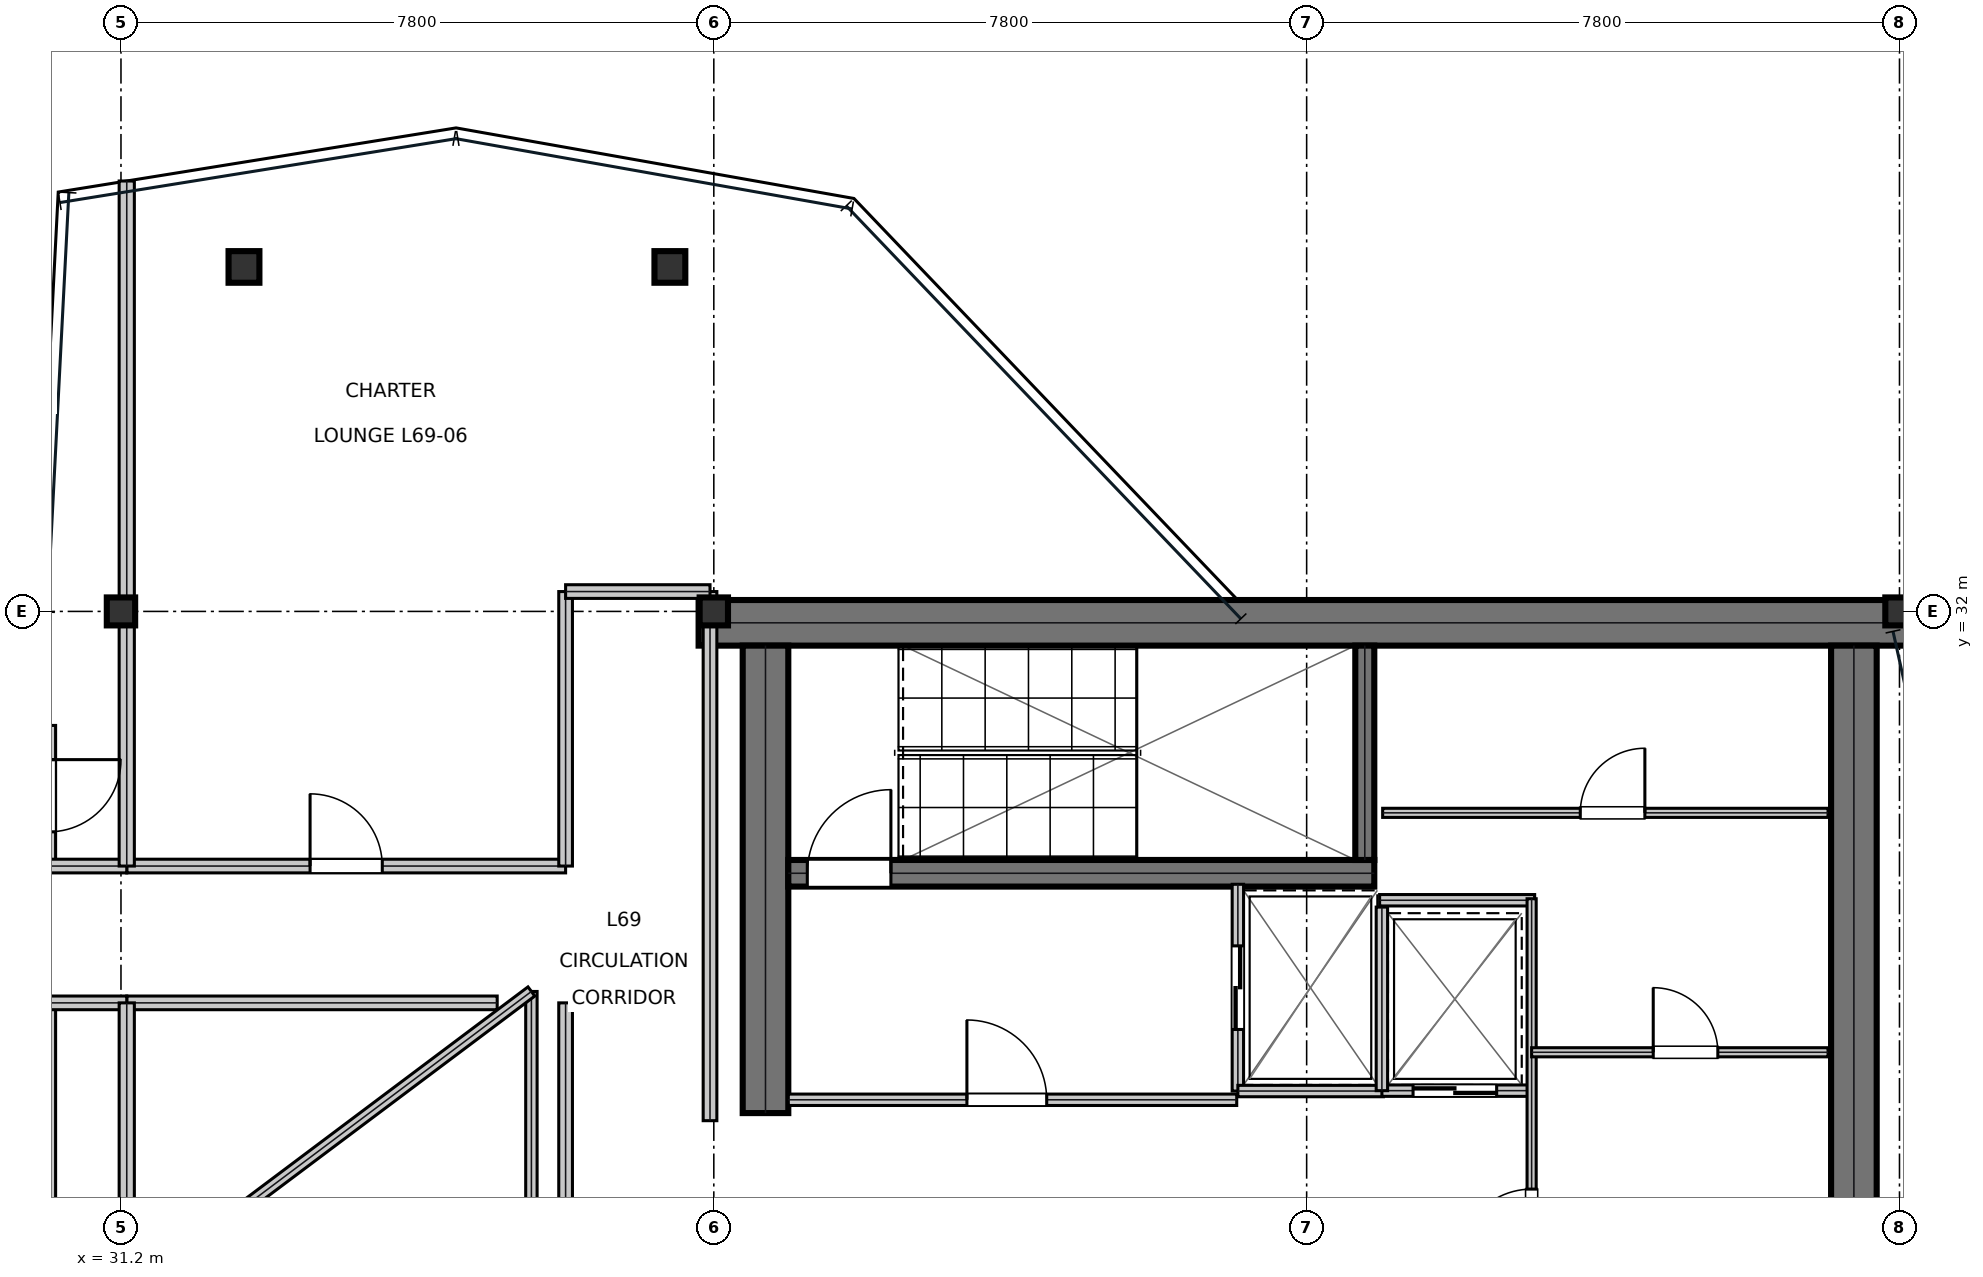
"""IFC4 building model, lengths in metres.
Left out: names, types, materials, properties, quantities, classifications, styles, units other than length and angle.
Written with IfcOpenShell. Run it as: python <this file> out.ifc"""

import sys

from ifc_helpers import new_model, si_unit, direction, frame, frame_2d, origin, origin_2d, place, context, subcontext, project, spatial, rectangle, i_section, extrude, element, fill, save


model = new_model("IFC4")
c1 = context("Model", 3, precision=1e-05, world=origin(), true_north=direction((0.0, 1.0)))
c2 = subcontext(c1, "Body", "Model", "MODEL_VIEW")
j1 = project(units=[si_unit("LENGTHUNIT", "METRE"), si_unit("PLANEANGLEUNIT", "RADIAN")], contexts=[c1])
p1 = place(None, origin())
s1 = spatial("IfcSite", under=j1, at=p1, CompositionType="ELEMENT")
p2 = place(p1, origin())
s2 = spatial("IfcBuilding", under=s1, at=p2, CompositionType="ELEMENT")
p3 = place(p2, frame((0.0, 0.0, 295.2)))
s3 = spatial("IfcBuildingStorey", under=s2, at=p3, CompositionType="ELEMENT", Elevation=295.2)
p4 = place(p3, frame((38.8, 31.85, 0.0), z_axis=(0.0, 0.0, 1.0), x_axis=(1.0, 0.0, 0.0)))
e1 = element("IfcWall", 1, at=p4, inside=s3, PredefinedType="SHEAR", context=c2, shape_type="SweptSolid", body=[
    extrude(rectangle(XDim=16.0, YDim=0.6, at=frame_2d((8.0, 0.0))), origin(), (0.0, 0.0, 1.0), 3.81),
])
p5 = place(p3, frame((39.68, 25.4, 0.0), z_axis=(0.0, 0.0, 1.0), x_axis=(0.0, 1.0, 0.0)))
e2 = element("IfcWall", 2, at=p5, inside=s3, PredefinedType="SHEAR", context=c2, shape_type="SweptSolid", body=[
    extrude(rectangle(XDim=6.15, YDim=0.6, at=frame_2d((3.075, 0.0))), origin(), (0.0, 0.0, 1.0), 3.81),
])
p6 = place(p3, frame((54.0, 16.45, 0.0), z_axis=(0.0, 0.0, 1.0), x_axis=(0.0, 1.0, 0.0)))
e3 = element("IfcWall", 3, at=p6, inside=s3, PredefinedType="SHEAR", context=c2, shape_type="SweptSolid", body=[
    extrude(rectangle(XDim=15.1, YDim=0.6, at=frame_2d((7.55, 0.0))), origin(), (0.0, 0.0, 1.0), 3.81),
])
p7 = place(p3, frame((39.98, 28.555, 0.0), z_axis=(0.0, 0.0, 1.0), x_axis=(1.0, 0.0, 0.0)))
e4 = element("IfcWall", 4, at=p7, inside=s3, PredefinedType="SHEAR", context=c2, shape_type="SweptSolid", body=[
    extrude(rectangle(XDim=7.71, YDim=0.35, at=frame_2d((3.855, 0.0))), origin(), (0.0, 0.0, 1.0), 3.81),
])
p8 = place(p7, frame((0.25, 0.0, 0.0)))
e5 = element("IfcOpeningElement", 5, at=p8, cuts=e4, PredefinedType="OPENING", context=c2, shape_type="SweptSolid", body=[
    extrude(rectangle(XDim=1.1, YDim=2.15, at=frame_2d((0.55, 1.075))), frame((0.0, 0.185, 0.0), z_axis=(0.0, -1.0, 0.0), x_axis=(1.0, 0.0, 0.0)), (0.0, 0.0, 1.0), 0.37),
])
p9 = place(p3, frame((47.565, 28.73, 0.0), z_axis=(0.0, 0.0, 1.0), x_axis=(0.0, 1.0, 0.0)))
e6 = element("IfcWall", 6, at=p9, inside=s3, PredefinedType="SHEAR", context=c2, shape_type="SweptSolid", body=[
    extrude(rectangle(XDim=2.82, YDim=0.25, at=frame_2d((1.41, 0.0))), origin(), (0.0, 0.0, 1.0), 3.81),
])
for number, where, z_axis, x_axis in (
    (7, (31.2, 32.0, 0.0), (0.0, 0.0, 1.0), (1.0, 0.0, 0.0)),
    (8, (39.0, 32.0, 0.0), (0.0, 0.0, 1.0), (1.0, 0.0, 0.0)),
    (9, (54.6, 32.0, 0.0), (0.0, 0.0, 1.0), (1.0, 0.0, 0.0)),
):
    element("IfcColumn", number, at=place(p3, frame(where, z_axis=z_axis, x_axis=x_axis)), inside=s3, PredefinedType="COLUMN", context=c2, shape_type="SweptSolid", body=[
        extrude(i_section(OverallWidth=0.373, OverallDepth=0.368, WebThickness=0.015, FlangeThickness=0.024, at=origin_2d()), origin(), (0.0, 0.0, 1.0), 4.044),
    ])
for number, where, z_axis, x_axis in (
    (10, (32.818, 36.532, 0.016), (0.0, 0.0, 1.0), (1.0, 0.0, 0.0)),
    (11, (38.422, 36.532, 0.016), (0.0, 0.0, 1.0), (1.0, 0.0, 0.0)),
):
    element("IfcColumn", number, at=place(p3, frame(where, z_axis=z_axis, x_axis=x_axis)), inside=s3, PredefinedType="COLUMN", context=c2, shape_type="SweptSolid", body=[
        extrude(i_section(OverallWidth=0.406, OverallDepth=0.416, WebThickness=0.03, FlangeThickness=0.048, at=origin_2d()), origin(), (0.0, 0.0, 1.0), 4.018),
    ])
p10 = place(p3, frame((39.98, 25.575, 0.0), z_axis=(0.0, 0.0, 1.0), x_axis=(1.0, 0.0, 0.0)))
e12 = element("IfcWall", 12, at=p10, inside=s3, PredefinedType="PARTITIONING", context=c2, shape_type="SweptSolid", body=[
    extrude(rectangle(XDim=5.9, YDim=0.15, at=frame_2d((2.95, 0.0))), origin(), (0.0, 0.0, 1.0), 3.81),
])
p11 = place(p10, frame((2.35, 0.0, 0.0)))
e13 = element("IfcOpeningElement", 13, at=p11, cuts=e12, PredefinedType="OPENING", context=c2, shape_type="SweptSolid", body=[
    extrude(rectangle(XDim=1.05, YDim=2.15, at=frame_2d((0.525, 1.075))), frame((0.0, 0.085, 0.0), z_axis=(0.0, -1.0, 0.0), x_axis=(1.0, 0.0, 0.0)), (0.0, 0.0, 1.0), 0.17),
])
p12 = place(p3, frame((45.895, 25.69, 0.0), z_axis=(0.0, 0.0, 1.0), x_axis=(0.0, 1.0, 0.0)))
e14 = element("IfcWall", 14, at=p12, inside=s3, PredefinedType="PARTITIONING", context=c2, shape_type="SweptSolid", body=[
    extrude(rectangle(XDim=2.72, YDim=0.15, at=frame_2d((1.36, 0.0))), origin(), (0.0, 0.0, 1.0), 3.81),
])
p13 = place(p12, frame((0.81, 0.0, 0.0)))
e15 = element("IfcOpeningElement", 15, at=p13, cuts=e14, PredefinedType="OPENING", context=c2, shape_type="SweptSolid", body=[
    extrude(rectangle(XDim=1.1, YDim=2.15, at=frame_2d((0.55, 1.075))), frame((0.0, 0.085, 0.0), z_axis=(0.0, -1.0, 0.0), x_axis=(1.0, 0.0, 0.0)), (0.0, 0.0, 1.0), 0.17),
])
p14 = place(p3, frame((45.895, 25.69, 0.0), z_axis=(0.0, 0.0, 1.0), x_axis=(1.0, 0.0, 0.0)))
e16 = element("IfcWall", 16, at=p14, inside=s3, PredefinedType="PARTITIONING", context=c2, shape_type="SweptSolid", body=[
    extrude(rectangle(XDim=1.915, YDim=0.15, at=frame_2d((0.958, 0.0))), origin(), (0.0, 0.0, 1.0), 3.81),
])
p15 = place(p3, frame((47.79, 25.695, 0.0), z_axis=(0.0, 0.0, 1.0), x_axis=(1.0, 0.0, 0.0)))
e17 = element("IfcWall", 17, at=p15, inside=s3, PredefinedType="PARTITIONING", context=c2, shape_type="SweptSolid", body=[
    extrude(rectangle(XDim=1.92, YDim=0.15, at=frame_2d((0.96, 0.0))), origin(), (0.0, 0.0, 1.0), 3.81),
])
p16 = place(p15, frame((0.41, 0.0, 0.0)))
e18 = element("IfcOpeningElement", 18, at=p16, cuts=e17, PredefinedType="OPENING", context=c2, shape_type="SweptSolid", body=[
    extrude(rectangle(XDim=1.1, YDim=2.15, at=frame_2d((0.55, 1.075))), frame((0.0, 0.085, 0.0), z_axis=(0.0, -1.0, 0.0), x_axis=(1.0, 0.0, 0.0)), (0.0, 0.0, 1.0), 0.17),
])
p17 = place(p3, frame((47.79, 25.695, 0.0), z_axis=(0.0, 0.0, 1.0), x_axis=(0.0, 1.0, 0.0)))
e19 = element("IfcWall", 19, at=p17, inside=s3, PredefinedType="PARTITIONING", context=c2, shape_type="SweptSolid", body=[
    extrude(rectangle(XDim=2.415, YDim=0.15, at=frame_2d((1.208, 0.0))), origin(), (0.0, 0.0, 1.0), 3.81),
])
p18 = place(p3, frame((47.76, 28.2, 0.0), z_axis=(0.0, 0.0, 1.0), x_axis=(1.0, 0.0, 0.0)))
e20 = element("IfcWall", 20, at=p18, inside=s3, PredefinedType="PARTITIONING", context=c2, shape_type="SweptSolid", body=[
    extrude(rectangle(XDim=2.04, YDim=0.15, at=frame_2d((1.02, 0.0))), origin(), (0.0, 0.0, 1.0), 3.81),
])
p19 = place(p3, frame((49.76, 22.5, 0.0), z_axis=(0.0, 0.0, 1.0), x_axis=(0.0, 1.0, 0.0)))
e21 = element("IfcWall", 21, at=p19, inside=s3, PredefinedType="PARTITIONING", context=c2, shape_type="SweptSolid", body=[
    extrude(rectangle(XDim=5.72, YDim=0.12, at=frame_2d((2.86, 0.0))), origin(), (0.0, 0.0, 1.0), 3.81),
])
p20 = place(p19, frame((0.95, 0.0, 0.0)))
e22 = element("IfcOpeningElement", 22, at=p20, cuts=e21, PredefinedType="OPENING", context=c2, shape_type="SweptSolid", body=[
    extrude(rectangle(XDim=0.95, YDim=2.15, at=frame_2d((0.475, 1.075))), frame((0.0, 0.07, 0.0), z_axis=(0.0, -1.0, 0.0), x_axis=(1.0, 0.0, 0.0)), (0.0, 0.0, 1.0), 0.14),
])
p21 = place(p3, frame((49.76, 26.2, 0.0), z_axis=(0.0, 0.0, 1.0), x_axis=(1.0, 0.0, 0.0)))
e23 = element("IfcWall", 23, at=p21, inside=s3, PredefinedType="PARTITIONING", context=c2, shape_type="SweptSolid", body=[
    extrude(rectangle(XDim=3.9, YDim=0.12, at=frame_2d((1.95, 0.0))), origin(), (0.0, 0.0, 1.0), 3.81),
])
p22 = place(p21, frame((1.6, 0.0, 0.0)))
e24 = element("IfcOpeningElement", 24, at=p22, cuts=e23, PredefinedType="OPENING", context=c2, shape_type="SweptSolid", body=[
    extrude(rectangle(XDim=0.85, YDim=2.15, at=frame_2d((0.425, 1.075))), frame((0.0, 0.07, 0.0), z_axis=(0.0, -1.0, 0.0), x_axis=(1.0, 0.0, 0.0)), (0.0, 0.0, 1.0), 0.14),
])
p23 = place(p3, frame((47.8, 29.35, 0.0), z_axis=(0.0, 0.0, 1.0), x_axis=(1.0, 0.0, 0.0)))
e25 = element("IfcWall", 25, at=p23, inside=s3, PredefinedType="PARTITIONING", context=c2, shape_type="SweptSolid", body=[
    extrude(rectangle(XDim=5.86, YDim=0.12, at=frame_2d((2.93, 0.0))), origin(), (0.0, 0.0, 1.0), 3.81),
])
p24 = place(p23, frame((2.6, 0.0, 0.0)))
e26 = element("IfcOpeningElement", 26, at=p24, cuts=e25, PredefinedType="OPENING", context=c2, shape_type="SweptSolid", body=[
    extrude(rectangle(XDim=0.85, YDim=2.15, at=frame_2d((0.425, 1.075))), frame((0.0, 0.07, 0.0), z_axis=(0.0, -1.0, 0.0), x_axis=(1.0, 0.0, 0.0)), (0.0, 0.0, 1.0), 0.14),
])
p25 = place(p3, frame((37.05, 15.739, 0.0), z_axis=(0.0, 0.0, 1.0), x_axis=(0.0, 1.0, 0.0)))
e27 = element("IfcWall", 27, at=p25, inside=s3, PredefinedType="SOLIDWALL", context=c2, shape_type="SweptSolid", body=[
    extrude(rectangle(XDim=11.111, YDim=0.18, at=frame_2d((5.556, 0.0))), origin(), (0.0, 0.0, 1.0), 3.27),
])
p26 = place(p25, frame((3.281, 0.0, 0.0)))
e28 = element("IfcOpeningElement", 28, at=p26, cuts=e27, PredefinedType="OPENING", context=c2, shape_type="SweptSolid", body=[
    extrude(rectangle(XDim=0.95, YDim=2.15, at=frame_2d((0.475, 1.075))), frame((0.0, 0.1, 0.0), z_axis=(0.0, -1.0, 0.0), x_axis=(1.0, 0.0, 0.0)), (0.0, 0.0, 1.0), 0.2),
])
p27 = place(p3, frame((30.25, 17.5, 0.0), z_axis=(0.0, 0.0, 1.0), x_axis=(0.0, 1.0, 0.0)))
e29 = element("IfcWall", 29, at=p27, inside=s3, PredefinedType="SOLIDWALL", context=c2, shape_type="SweptSolid", body=[
    extrude(rectangle(XDim=9.35, YDim=0.18, at=frame_2d((4.675, 0.0))), origin(), (0.0, 0.0, 1.0), 3.27),
])
p28 = place(p27, frame((4.02, 0.0, 0.0)))
e30 = element("IfcOpeningElement", 30, at=p28, cuts=e29, PredefinedType="OPENING", context=c2, shape_type="SweptSolid", body=[
    extrude(rectangle(XDim=0.95, YDim=2.15, at=frame_2d((0.475, 1.075))), frame((0.0, 0.1, 0.0), z_axis=(0.0, -1.0, 0.0), x_axis=(1.0, 0.0, 0.0)), (0.0, 0.0, 1.0), 0.2),
])
p29 = place(p3, frame((30.25, 28.65, 0.0), z_axis=(0.0, 0.0, 1.0), x_axis=(0.0, 1.0, 0.0)))
e31 = element("IfcWall", 31, at=p29, inside=s3, PredefinedType="SOLIDWALL", context=c2, shape_type="SweptSolid", body=[
    extrude(rectangle(XDim=1.85, YDim=0.18, at=frame_2d((0.925, 0.0))), origin(), (0.0, 0.0, 1.0), 3.81),
])
p30 = place(p29, frame((0.45, 0.0, 0.0)))
e32 = element("IfcOpeningElement", 32, at=p30, cuts=e31, PredefinedType="OPENING", context=c2, shape_type="SweptSolid", body=[
    extrude(rectangle(XDim=0.95, YDim=2.15, at=frame_2d((0.475, 1.075))), frame((0.0, 0.1, 0.0), z_axis=(0.0, -1.0, 0.0), x_axis=(1.0, 0.0, 0.0)), (0.0, 0.0, 1.0), 0.2),
])
p31 = place(p3, frame((31.276, 28.65, 0.0), z_axis=(0.0, 0.0, 1.0), x_axis=(1.0, 0.0, 0.0)))
e33 = element("IfcWall", 33, at=p31, inside=s3, PredefinedType="SOLIDWALL", context=c2, shape_type="SweptSolid", body=[
    extrude(rectangle(XDim=5.774, YDim=0.18, at=frame_2d((2.887, 0.0))), origin(), (0.0, 0.0, 1.0), 3.81),
])
p32 = place(p31, frame((2.412, 0.0, 0.0)))
e34 = element("IfcOpeningElement", 34, at=p32, cuts=e33, PredefinedType="OPENING", context=c2, shape_type="SweptSolid", body=[
    extrude(rectangle(XDim=0.95, YDim=2.15, at=frame_2d((0.475, 1.075))), frame((0.0, 0.1, 0.0), z_axis=(0.0, -1.0, 0.0), x_axis=(1.0, 0.0, 0.0)), (0.0, 0.0, 1.0), 0.2),
])
p33 = place(p3, frame((31.276, 26.85, 0.0), z_axis=(0.0, 0.0, 1.0), x_axis=(1.0, 0.0, 0.0)))
e35 = element("IfcWall", 35, at=p33, inside=s3, PredefinedType="SOLIDWALL", context=c2, shape_type="SweptSolid", body=[
    extrude(rectangle(XDim=4.874, YDim=0.18, at=frame_2d((2.437, 0.0))), origin(), (0.0, 0.0, 1.0), 3.81),
])
for number, where, z_axis, x_axis in (
    (36, (30.25, 26.85, 0.0), (0.0, 0.0, 1.0), (1.0, 0.0, 0.0)),
    (37, (30.25, 28.65, 0.0), (0.0, 0.0, 1.0), (1.0, 0.0, 0.0)),
):
    element("IfcWall", number, at=place(p3, frame(where, z_axis=z_axis, x_axis=x_axis)), inside=s3, PredefinedType="SOLIDWALL", context=c2, shape_type="SweptSolid", body=[
        extrude(rectangle(XDim=1.026, YDim=0.18, at=frame_2d((0.513, 0.0))), origin(), (0.0, 0.0, 1.0), 3.27),
    ])
p34 = place(p3, frame((38.95, 25.3, 0.0), z_axis=(0.0, 0.0, 1.0), x_axis=(0.0, 1.0, 0.0)))
e38 = element("IfcWall", 38, at=p34, inside=s3, PredefinedType="SOLIDWALL", context=c2, shape_type="SweptSolid", body=[
    extrude(rectangle(XDim=6.961, YDim=0.18, at=frame_2d((3.48, 0.0))), origin(), (0.0, 0.0, 1.0), 3.27),
])
p35 = place(p3, frame((37.05, 28.65, 0.0), z_axis=(0.0, 0.0, 1.0), x_axis=(0.0, 1.0, 0.0)))
e39 = element("IfcWall", 39, at=p35, inside=s3, PredefinedType="SOLIDWALL", context=c2, shape_type="SweptSolid", body=[
    extrude(rectangle(XDim=3.611, YDim=0.18, at=frame_2d((1.806, 0.0))), origin(), (0.0, 0.0, 1.0), 3.27),
])
p36 = place(p3, frame((37.05, 32.261, 0.0), z_axis=(0.0, 0.0, 1.0), x_axis=(1.0, 0.0, 0.0)))
e40 = element("IfcWall", 40, at=p36, inside=s3, PredefinedType="SOLIDWALL", context=c2, shape_type="SweptSolid", body=[
    extrude(rectangle(XDim=1.9, YDim=0.18, at=frame_2d((0.95, 0.0))), origin(), (0.0, 0.0, 1.0), 3.27),
])
p37 = place(p3, frame((31.276, 10.337, 0.0), z_axis=(0.0, 0.0, 1.0), x_axis=(0.0, 1.0, 0.0)))
e41 = element("IfcWall", 41, at=p37, inside=s3, PredefinedType="SOLIDWALL", context=c2, shape_type="SweptSolid", body=[
    extrude(rectangle(XDim=16.513, YDim=0.2, at=frame_2d((8.256, 0.0))), origin(), (0.0, 0.0, 1.0), 3.27),
])
p38 = place(p3, frame((31.276, 28.65, 0.0), z_axis=(0.0, 0.0, 1.0), x_axis=(0.0, 1.0, 0.0)))
e42 = element("IfcWall", 42, at=p38, inside=s3, PredefinedType="SOLIDWALL", context=c2, shape_type="SweptSolid", body=[
    extrude(rectangle(XDim=9.013, YDim=0.2, at=frame_2d((4.506, 0.0))), origin(), (0.0, 0.0, 1.0), 3.27),
])
p39 = place(p3, frame((36.6, 21.0, 0.0), z_axis=(0.0, 0.0, 1.0), x_axis=(0.0, 1.0, 0.0)))
e43 = element("IfcWall", 43, at=p39, inside=s3, PredefinedType="MOVABLE", context=c2, shape_type="SweptSolid", body=[
    extrude(rectangle(XDim=6.0, YDim=0.15, at=frame_2d((3.0, 0.0))), origin(), (0.0, 0.0, 1.0), 3.81),
])
p40 = place(p3, frame((36.6, 27.0, 0.0), z_axis=(0.0, 0.0, 1.0), x_axis=(-0.8, -0.6, 0.0)))
e44 = element("IfcWall", 44, at=p40, inside=s3, PredefinedType="MOVABLE", context=c2, shape_type="SweptSolid", body=[
    extrude(rectangle(XDim=5.0, YDim=0.15, at=frame_2d((2.5, 0.0))), origin(), (0.0, 0.0, 1.0), 3.81),
])
p41 = place(p11, origin())
e45 = element("IfcDoor", 45, at=p41, inside=s3, OperationType="SINGLE_SWING_LEFT", PredefinedType="DOOR", context=c2, shape_type="SweptSolid", body=[
    extrude(rectangle(XDim=1.05, YDim=2.15, at=frame_2d((0.525, 1.075))), frame((0.0, 0.025, 0.0), z_axis=(0.0, -1.0, 0.0), x_axis=(1.0, 0.0, 0.0)), (0.0, 0.0, 1.0), 0.05),
])
fill(e13, e45)
p42 = place(p13, frame((1.1, 0.0, 0.0), z_axis=(0.0, 0.0, 1.0), x_axis=(-1.0, 0.0, 0.0)))
e46 = element("IfcDoor", 46, at=p42, inside=s3, OperationType="DOUBLE_DOOR_SLIDING", PredefinedType="DOOR", context=c2, shape_type="SweptSolid", body=[
    extrude(rectangle(XDim=1.1, YDim=2.15, at=frame_2d((0.55, 1.075))), frame((0.0, 0.025, 0.0), z_axis=(0.0, -1.0, 0.0), x_axis=(1.0, 0.0, 0.0)), (0.0, 0.0, 1.0), 0.05),
])
fill(e15, e46)
p43 = place(p16, frame((1.1, 0.0, 0.0), z_axis=(0.0, 0.0, 1.0), x_axis=(-1.0, 0.0, 0.0)))
e47 = element("IfcDoor", 47, at=p43, inside=s3, OperationType="DOUBLE_DOOR_SLIDING", PredefinedType="DOOR", context=c2, shape_type="SweptSolid", body=[
    extrude(rectangle(XDim=1.1, YDim=2.15, at=frame_2d((0.55, 1.075))), frame((0.0, 0.025, 0.0), z_axis=(0.0, -1.0, 0.0), x_axis=(1.0, 0.0, 0.0)), (0.0, 0.0, 1.0), 0.05),
])
fill(e18, e47)
p44 = place(p20, origin())
e48 = element("IfcDoor", 48, at=p44, inside=s3, OperationType="SINGLE_SWING_LEFT", PredefinedType="DOOR", context=c2, shape_type="SweptSolid", body=[
    extrude(rectangle(XDim=0.95, YDim=2.15, at=frame_2d((0.475, 1.075))), frame((0.0, 0.025, 0.0), z_axis=(0.0, -1.0, 0.0), x_axis=(1.0, 0.0, 0.0)), (0.0, 0.0, 1.0), 0.05),
])
fill(e22, e48)
p45 = place(p22, origin())
e49 = element("IfcDoor", 49, at=p45, inside=s3, OperationType="SINGLE_SWING_LEFT", PredefinedType="DOOR", context=c2, shape_type="SweptSolid", body=[
    extrude(rectangle(XDim=0.85, YDim=2.15, at=frame_2d((0.425, 1.075))), frame((0.0, 0.025, 0.0), z_axis=(0.0, -1.0, 0.0), x_axis=(1.0, 0.0, 0.0)), (0.0, 0.0, 1.0), 0.05),
])
fill(e24, e49)
p46 = place(p24, origin())
e50 = element("IfcDoor", 50, at=p46, inside=s3, OperationType="SINGLE_SWING_RIGHT", PredefinedType="DOOR", context=c2, shape_type="SweptSolid", body=[
    extrude(rectangle(XDim=0.85, YDim=2.15, at=frame_2d((0.425, 1.075))), frame((0.0, 0.025, 0.0), z_axis=(0.0, -1.0, 0.0), x_axis=(1.0, 0.0, 0.0)), (0.0, 0.0, 1.0), 0.05),
])
fill(e26, e50)
p47 = place(p32, origin())
e51 = element("IfcDoor", 51, at=p47, inside=s3, OperationType="SINGLE_SWING_LEFT", PredefinedType="DOOR", context=c2, shape_type="SweptSolid", body=[
    extrude(rectangle(XDim=0.95, YDim=2.15, at=frame_2d((0.475, 1.075))), frame((0.0, 0.025, 0.0), z_axis=(0.0, -1.0, 0.0), x_axis=(1.0, 0.0, 0.0)), (0.0, 0.0, 1.0), 0.05),
])
fill(e34, e51)
p48 = place(p8, origin())
e52 = element("IfcDoor", 52, at=p48, inside=s3, OperationType="SINGLE_SWING_RIGHT", PredefinedType="DOOR", context=c2, shape_type="SweptSolid", body=[
    extrude(rectangle(XDim=1.1, YDim=2.15, at=frame_2d((0.55, 1.075))), frame((0.0, 0.025, 0.0), z_axis=(0.0, -1.0, 0.0), x_axis=(1.0, 0.0, 0.0)), (0.0, 0.0, 1.0), 0.05),
])
fill(e5, e52)
save(model, sys.argv[1])
